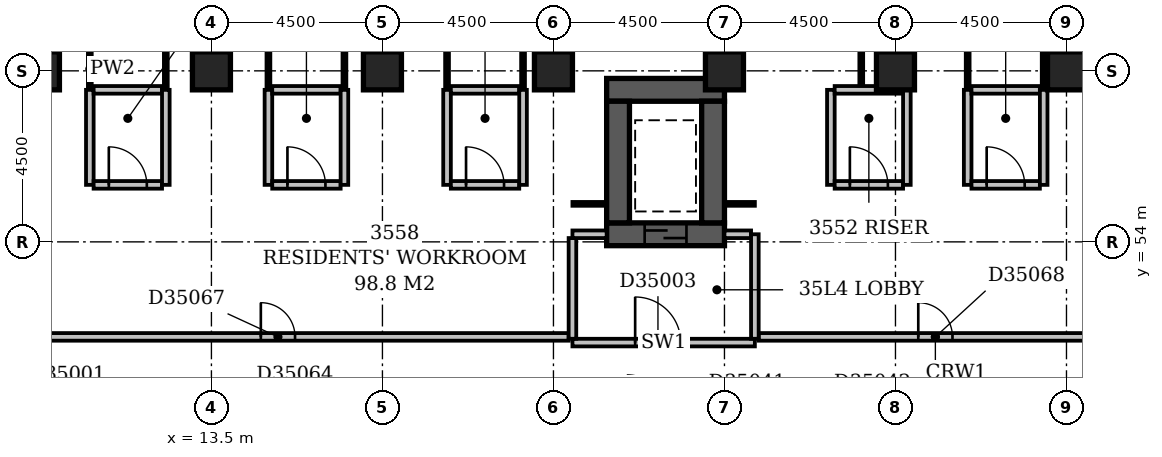
"""IFC4 building model, lengths in metres.
Left out: names, types, materials, properties, quantities, classifications, styles, units other than length and angle.
Written with IfcOpenShell. Run it as: python <this file> out.ifc"""

import sys

from ifc_helpers import new_model, si_unit, direction, frame, frame_2d, origin, origin_2d, place, context, subcontext, project, spatial, rectangle, extrude, element, fill, save


model = new_model("IFC4")
c1 = context("Model", 3, precision=1e-05, world=origin(), true_north=direction((0.0, 1.0)))
c2 = subcontext(c1, "Body", "Model", "MODEL_VIEW")
j1 = project(units=[si_unit("LENGTHUNIT", "METRE"), si_unit("PLANEANGLEUNIT", "RADIAN")], contexts=[c1])
p1 = place(None, origin())
s1 = spatial("IfcSite", under=j1, at=p1, CompositionType="ELEMENT")
p2 = place(p1, origin())
s2 = spatial("IfcBuilding", under=s1, at=p2, CompositionType="ELEMENT")
p3 = place(p2, frame((0.0, 0.0, 141.2)))
s3 = spatial("IfcBuildingStorey", under=s2, at=p3, CompositionType="ELEMENT", Elevation=141.2)
p4 = place(p3, frame((23.9, 54.2, -0.3), z_axis=(0.0, 0.0, 1.0), x_axis=(1.0, 0.0, 0.0)))
e1 = element("IfcWall", 1, at=p4, inside=s3, PredefinedType="SHEAR", context=c2, shape_type="SweptSolid", body=[
    extrude(rectangle(XDim=3.1, YDim=0.6, at=frame_2d((1.55, 0.0))), origin(), (0.0, 0.0, 1.0), 3.6),
])
p5 = place(p4, frame((1.0, 0.0, 0.3)))
e2 = element("IfcOpeningElement", 2, at=p5, cuts=e1, PredefinedType="OPENING", context=c2, shape_type="SweptSolid", body=[
    extrude(rectangle(XDim=1.1, YDim=2.1, at=frame_2d((0.55, 1.05))), frame((0.0, 0.312, 0.0), z_axis=(0.0, -1.0, 0.0), x_axis=(1.0, 0.0, 0.0)), (0.0, 0.0, 1.0), 0.624),
])
p6 = place(p3, frame((23.9, 58.0, -0.3), z_axis=(0.0, 0.0, 1.0), x_axis=(1.0, 0.0, 0.0)))
e3 = element("IfcWall", 3, at=p6, inside=s3, PredefinedType="SHEAR", context=c2, shape_type="SweptSolid", body=[
    extrude(rectangle(XDim=3.1, YDim=0.6, at=frame_2d((1.55, 0.0))), origin(), (0.0, 0.0, 1.0), 3.6),
])
for number, where, z_axis, x_axis in (
    (4, (24.2, 54.5, -0.3), (0.0, 0.0, 1.0), (0.0, 1.0, 0.0)),
    (5, (26.7, 54.5, -0.3), (0.0, 0.0, 1.0), (0.0, 1.0, 0.0)),
):
    element("IfcWall", number, at=place(p3, frame(where, z_axis=z_axis, x_axis=x_axis)), inside=s3, PredefinedType="SHEAR", context=c2, shape_type="SweptSolid", body=[
        extrude(rectangle(XDim=3.2, YDim=0.6, at=frame_2d((1.6, 0.0))), origin(), (0.0, 0.0, 1.0), 3.6),
    ])
for number, where, z_axis, x_axis in (
    (6, (9.0, 58.5, -0.3), (0.0, 0.0, 1.0), (1.0, 0.0, 0.0)),
    (7, (13.5, 58.5, -0.3), (0.0, 0.0, 1.0), (1.0, 0.0, 0.0)),
    (8, (18.0, 58.5, -0.3), (0.0, 0.0, 1.0), (1.0, 0.0, 0.0)),
    (9, (22.5, 58.5, -0.3), (0.0, 0.0, 1.0), (1.0, 0.0, 0.0)),
    (10, (27.0, 58.5, -0.3), (0.0, 0.0, 1.0), (1.0, 0.0, 0.0)),
    (11, (31.5, 58.5, -0.3), (0.0, 0.0, 1.0), (1.0, 0.0, 0.0)),
    (12, (36.0, 58.5, -0.3), (0.0, 0.0, 1.0), (1.0, 0.0, 0.0)),
):
    element("IfcColumn", number, at=place(p3, frame(where, z_axis=z_axis, x_axis=x_axis)), inside=s3, PredefinedType="COLUMN", context=c2, shape_type="SweptSolid", body=[
        extrude(rectangle(XDim=1.0, YDim=1.0, at=origin_2d()), origin(), (0.0, 0.0, 1.0), 3.6),
    ])
p7 = place(p3, frame((23.0, 51.35, 0.0), z_axis=(0.0, 0.0, 1.0), x_axis=(1.0, 0.0, 0.0)))
e13 = element("IfcWall", 13, at=p7, inside=s3, PredefinedType="PARTITIONING", context=c2, shape_type="SweptSolid", body=[
    extrude(rectangle(XDim=4.8, YDim=0.2, at=frame_2d((2.4, 0.0))), origin(), (0.0, 0.0, 1.0), 3.3),
])
p8 = place(p7, frame((1.65, 0.0, 0.0)))
e14 = element("IfcOpeningElement", 14, at=p8, cuts=e13, PredefinedType="OPENING", context=c2, shape_type="SweptSolid", body=[
    extrude(rectangle(XDim=1.2, YDim=2.1, at=frame_2d((0.6, 1.05))), frame((0.0, 0.112, 0.0), z_axis=(0.0, -1.0, 0.0), x_axis=(1.0, 0.0, 0.0)), (0.0, 0.0, 1.0), 0.224),
])
p9 = place(p3, frame((27.8, 51.45, 0.0), z_axis=(0.0, 0.0, 1.0), x_axis=(0.0, 1.0, 0.0)))
e15 = element("IfcWall", 15, at=p9, inside=s3, PredefinedType="PARTITIONING", context=c2, shape_type="SweptSolid", body=[
    extrude(rectangle(XDim=2.75, YDim=0.2, at=frame_2d((1.375, 0.0))), origin(), (0.0, 0.0, 1.0), 3.3),
])
p10 = place(p3, frame((23.0, 54.2, 0.0), z_axis=(0.0, 0.0, 1.0), x_axis=(1.0, 0.0, 0.0)))
e16 = element("IfcWall", 16, at=p10, inside=s3, PredefinedType="PARTITIONING", context=c2, shape_type="SweptSolid", body=[
    extrude(rectangle(XDim=0.9, YDim=0.2, at=frame_2d((0.45, 0.0))), origin(), (0.0, 0.0, 1.0), 3.3),
])
p11 = place(p3, frame((27.0, 54.2, 0.0), z_axis=(0.0, 0.0, 1.0), x_axis=(1.0, 0.0, 0.0)))
e17 = element("IfcWall", 17, at=p11, inside=s3, PredefinedType="PARTITIONING", context=c2, shape_type="SweptSolid", body=[
    extrude(rectangle(XDim=0.7, YDim=0.2, at=frame_2d((0.35, 0.0))), origin(), (0.0, 0.0, 1.0), 3.3),
])
p12 = place(p3, frame((23.0, 51.45, 0.0), z_axis=(0.0, 0.0, 1.0), x_axis=(0.0, 1.0, 0.0)))
e18 = element("IfcWall", 18, at=p12, inside=s3, PredefinedType="PARTITIONING", context=c2, shape_type="SweptSolid", body=[
    extrude(rectangle(XDim=2.65, YDim=0.2, at=frame_2d((1.325, 0.0))), origin(), (0.0, 0.0, 1.0), 3.3),
])
p13 = place(p3, frame((7.6, 51.5, 0.0), z_axis=(0.0, 0.0, 1.0), x_axis=(1.0, 0.0, 0.0)))
e19 = element("IfcWall", 19, at=p13, inside=s3, PredefinedType="PARTITIONING", context=c2, shape_type="SweptSolid", body=[
    extrude(rectangle(XDim=15.3, YDim=0.2, at=frame_2d((7.65, 0.0))), origin(), (0.0, 0.0, 1.0), 3.3),
])
p14 = place(p13, frame((7.2, 0.0, 0.0)))
e20 = element("IfcOpeningElement", 20, at=p14, cuts=e19, PredefinedType="OPENING", context=c2, shape_type="SweptSolid", body=[
    extrude(rectangle(XDim=0.9, YDim=2.1, at=frame_2d((0.45, 1.05))), frame((0.0, 0.112, 0.0), z_axis=(0.0, -1.0, 0.0), x_axis=(1.0, 0.0, 0.0)), (0.0, 0.0, 1.0), 0.224),
])
p15 = place(p3, frame((27.9, 51.5, 0.0), z_axis=(0.0, 0.0, 1.0), x_axis=(1.0, 0.0, 0.0)))
e21 = element("IfcWall", 21, at=p15, inside=s3, PredefinedType="PARTITIONING", context=c2, shape_type="SweptSolid", body=[
    extrude(rectangle(XDim=9.3, YDim=0.2, at=frame_2d((4.65, 0.0))), origin(), (0.0, 0.0, 1.0), 3.3),
])
p16 = place(p15, frame((4.2, 0.0, 0.0)))
e22 = element("IfcOpeningElement", 22, at=p16, cuts=e21, PredefinedType="OPENING", context=c2, shape_type="SweptSolid", body=[
    extrude(rectangle(XDim=0.9, YDim=2.1, at=frame_2d((0.45, 1.05))), frame((0.0, 0.112, 0.0), z_axis=(0.0, -1.0, 0.0), x_axis=(1.0, 0.0, 0.0)), (0.0, 0.0, 1.0), 0.224),
])
p17 = place(p3, frame((23.0, 55.0, 0.0), z_axis=(0.0, 0.0, 1.0), x_axis=(1.0, 0.0, 0.0)))
e23 = element("IfcWall", 23, at=p17, inside=s3, PredefinedType="PARTITIONING", context=c2, shape_type="SweptSolid", body=[
    extrude(rectangle(XDim=0.9, YDim=0.1, at=frame_2d((0.45, 0.0))), origin(), (0.0, 0.0, 1.0), 3.3),
])
p18 = place(p3, frame((27.0, 55.0, 0.0), z_axis=(0.0, 0.0, 1.0), x_axis=(1.0, 0.0, 0.0)))
e24 = element("IfcWall", 24, at=p18, inside=s3, PredefinedType="PARTITIONING", context=c2, shape_type="SweptSolid", body=[
    extrude(rectangle(XDim=0.8, YDim=0.1, at=frame_2d((0.4, 0.0))), origin(), (0.0, 0.0, 1.0), 3.3),
])
p19 = place(p3, frame((10.3, 55.5, 0.0), z_axis=(0.0, 0.0, 1.0), x_axis=(0.0, 1.0, 0.0)))
e25 = element("IfcWall", 25, at=p19, inside=s3, PredefinedType="PARTITIONING", context=c2, shape_type="SweptSolid", body=[
    extrude(rectangle(XDim=2.5, YDim=0.2, at=frame_2d((1.25, 0.0))), origin(), (0.0, 0.0, 1.0), 3.3),
])
p20 = place(p3, frame((10.4, 55.5, 0.0), z_axis=(0.0, 0.0, 1.0), x_axis=(1.0, 0.0, 0.0)))
e26 = element("IfcWall", 26, at=p20, inside=s3, PredefinedType="PARTITIONING", context=c2, shape_type="SweptSolid", body=[
    extrude(rectangle(XDim=1.8, YDim=0.2, at=frame_2d((0.9, 0.0))), origin(), (0.0, 0.0, 1.0), 3.3),
])
p21 = place(p20, frame((0.4, 0.0, 0.0)))
e27 = element("IfcOpeningElement", 27, at=p21, cuts=e26, PredefinedType="OPENING", context=c2, shape_type="SweptSolid", body=[
    extrude(rectangle(XDim=1.0, YDim=2.1, at=frame_2d((0.5, 1.05))), frame((0.0, 0.112, 0.0), z_axis=(0.0, -1.0, 0.0), x_axis=(1.0, 0.0, 0.0)), (0.0, 0.0, 1.0), 0.224),
])
for number, where, z_axis, x_axis in (
    (28, (12.3, 55.5, 0.0), (0.0, 0.0, 1.0), (0.0, 1.0, 0.0)),
    (29, (15.0, 55.5, 0.0), (0.0, 0.0, 1.0), (0.0, 1.0, 0.0)),
):
    element("IfcWall", number, at=place(p3, frame(where, z_axis=z_axis, x_axis=x_axis)), inside=s3, PredefinedType="PARTITIONING", context=c2, shape_type="SweptSolid", body=[
        extrude(rectangle(XDim=2.5, YDim=0.2, at=frame_2d((1.25, 0.0))), origin(), (0.0, 0.0, 1.0), 3.3),
    ])
p22 = place(p3, frame((15.1, 55.5, 0.0), z_axis=(0.0, 0.0, 1.0), x_axis=(1.0, 0.0, 0.0)))
e30 = element("IfcWall", 30, at=p22, inside=s3, PredefinedType="PARTITIONING", context=c2, shape_type="SweptSolid", body=[
    extrude(rectangle(XDim=1.8, YDim=0.2, at=frame_2d((0.9, 0.0))), origin(), (0.0, 0.0, 1.0), 3.3),
])
p23 = place(p22, frame((0.4, 0.0, 0.0)))
e31 = element("IfcOpeningElement", 31, at=p23, cuts=e30, PredefinedType="OPENING", context=c2, shape_type="SweptSolid", body=[
    extrude(rectangle(XDim=1.0, YDim=2.1, at=frame_2d((0.5, 1.05))), frame((0.0, 0.112, 0.0), z_axis=(0.0, -1.0, 0.0), x_axis=(1.0, 0.0, 0.0)), (0.0, 0.0, 1.0), 0.224),
])
for number, where, z_axis, x_axis in (
    (32, (17.0, 55.5, 0.0), (0.0, 0.0, 1.0), (0.0, 1.0, 0.0)),
    (33, (19.7, 55.5, 0.0), (0.0, 0.0, 1.0), (0.0, 1.0, 0.0)),
):
    element("IfcWall", number, at=place(p3, frame(where, z_axis=z_axis, x_axis=x_axis)), inside=s3, PredefinedType="PARTITIONING", context=c2, shape_type="SweptSolid", body=[
        extrude(rectangle(XDim=2.5, YDim=0.2, at=frame_2d((1.25, 0.0))), origin(), (0.0, 0.0, 1.0), 3.3),
    ])
p24 = place(p3, frame((19.8, 55.5, 0.0), z_axis=(0.0, 0.0, 1.0), x_axis=(1.0, 0.0, 0.0)))
e34 = element("IfcWall", 34, at=p24, inside=s3, PredefinedType="PARTITIONING", context=c2, shape_type="SweptSolid", body=[
    extrude(rectangle(XDim=1.8, YDim=0.2, at=frame_2d((0.9, 0.0))), origin(), (0.0, 0.0, 1.0), 3.3),
])
p25 = place(p24, frame((0.4, 0.0, 0.0)))
e35 = element("IfcOpeningElement", 35, at=p25, cuts=e34, PredefinedType="OPENING", context=c2, shape_type="SweptSolid", body=[
    extrude(rectangle(XDim=1.0, YDim=2.1, at=frame_2d((0.5, 1.05))), frame((0.0, 0.112, 0.0), z_axis=(0.0, -1.0, 0.0), x_axis=(1.0, 0.0, 0.0)), (0.0, 0.0, 1.0), 0.224),
])
for number, where, z_axis, x_axis in (
    (36, (21.7, 55.5, 0.0), (0.0, 0.0, 1.0), (0.0, 1.0, 0.0)),
    (37, (29.8, 55.5, 0.0), (0.0, 0.0, 1.0), (0.0, 1.0, 0.0)),
):
    element("IfcWall", number, at=place(p3, frame(where, z_axis=z_axis, x_axis=x_axis)), inside=s3, PredefinedType="PARTITIONING", context=c2, shape_type="SweptSolid", body=[
        extrude(rectangle(XDim=2.5, YDim=0.2, at=frame_2d((1.25, 0.0))), origin(), (0.0, 0.0, 1.0), 3.3),
    ])
p26 = place(p3, frame((29.9, 55.5, 0.0), z_axis=(0.0, 0.0, 1.0), x_axis=(1.0, 0.0, 0.0)))
e38 = element("IfcWall", 38, at=p26, inside=s3, PredefinedType="PARTITIONING", context=c2, shape_type="SweptSolid", body=[
    extrude(rectangle(XDim=1.8, YDim=0.2, at=frame_2d((0.9, 0.0))), origin(), (0.0, 0.0, 1.0), 3.3),
])
p27 = place(p26, frame((0.4, 0.0, 0.0)))
e39 = element("IfcOpeningElement", 39, at=p27, cuts=e38, PredefinedType="OPENING", context=c2, shape_type="SweptSolid", body=[
    extrude(rectangle(XDim=1.0, YDim=2.1, at=frame_2d((0.5, 1.05))), frame((0.0, 0.112, 0.0), z_axis=(0.0, -1.0, 0.0), x_axis=(1.0, 0.0, 0.0)), (0.0, 0.0, 1.0), 0.224),
])
for number, where, z_axis, x_axis in (
    (40, (31.8, 55.5, 0.0), (0.0, 0.0, 1.0), (0.0, 1.0, 0.0)),
    (41, (33.4, 55.5, 0.0), (0.0, 0.0, 1.0), (0.0, 1.0, 0.0)),
):
    element("IfcWall", number, at=place(p3, frame(where, z_axis=z_axis, x_axis=x_axis)), inside=s3, PredefinedType="PARTITIONING", context=c2, shape_type="SweptSolid", body=[
        extrude(rectangle(XDim=2.5, YDim=0.2, at=frame_2d((1.25, 0.0))), origin(), (0.0, 0.0, 1.0), 3.3),
    ])
p28 = place(p3, frame((33.5, 55.5, 0.0), z_axis=(0.0, 0.0, 1.0), x_axis=(1.0, 0.0, 0.0)))
e42 = element("IfcWall", 42, at=p28, inside=s3, PredefinedType="PARTITIONING", context=c2, shape_type="SweptSolid", body=[
    extrude(rectangle(XDim=1.8, YDim=0.2, at=frame_2d((0.9, 0.0))), origin(), (0.0, 0.0, 1.0), 3.3),
])
p29 = place(p28, frame((0.4, 0.0, 0.0)))
e43 = element("IfcOpeningElement", 43, at=p29, cuts=e42, PredefinedType="OPENING", context=c2, shape_type="SweptSolid", body=[
    extrude(rectangle(XDim=1.0, YDim=2.1, at=frame_2d((0.5, 1.05))), frame((0.0, 0.112, 0.0), z_axis=(0.0, -1.0, 0.0), x_axis=(1.0, 0.0, 0.0)), (0.0, 0.0, 1.0), 0.224),
])
p30 = place(p3, frame((35.4, 55.5, 0.0), z_axis=(0.0, 0.0, 1.0), x_axis=(0.0, 1.0, 0.0)))
e44 = element("IfcWall", 44, at=p30, inside=s3, PredefinedType="PARTITIONING", context=c2, shape_type="SweptSolid", body=[
    extrude(rectangle(XDim=2.5, YDim=0.2, at=frame_2d((1.25, 0.0))), origin(), (0.0, 0.0, 1.0), 2.4),
])
p31 = place(p3, frame((10.3, 58.0, 0.0), z_axis=(0.0, 0.0, 1.0), x_axis=(0.0, 1.0, 0.0)))
e45 = element("IfcWall", 45, at=p31, inside=s3, PredefinedType="PARTITIONING", context=c2, shape_type="SweptSolid", body=[
    extrude(rectangle(XDim=1.1, YDim=0.1, at=frame_2d((0.55, 0.0))), origin(), (0.0, 0.0, 1.0), 3.3),
])
p32 = place(p3, frame((10.4, 58.0, 0.0), z_axis=(0.0, 0.0, 1.0), x_axis=(1.0, 0.0, 0.0)))
e46 = element("IfcWall", 46, at=p32, inside=s3, PredefinedType="PARTITIONING", context=c2, shape_type="SweptSolid", body=[
    extrude(rectangle(XDim=1.8, YDim=0.2, at=frame_2d((0.9, 0.0))), origin(), (0.0, 0.0, 1.0), 3.3),
])
for number, where, z_axis, x_axis in (
    (47, (12.3, 58.0, 0.0), (0.0, 0.0, 1.0), (0.0, 1.0, 0.0)),
    (48, (15.0, 58.0, 0.0), (0.0, 0.0, 1.0), (0.0, 1.0, 0.0)),
):
    element("IfcWall", number, at=place(p3, frame(where, z_axis=z_axis, x_axis=x_axis)), inside=s3, PredefinedType="PARTITIONING", context=c2, shape_type="SweptSolid", body=[
        extrude(rectangle(XDim=1.1, YDim=0.1, at=frame_2d((0.55, 0.0))), origin(), (0.0, 0.0, 1.0), 3.3),
    ])
p33 = place(p3, frame((15.1, 58.0, 0.0), z_axis=(0.0, 0.0, 1.0), x_axis=(1.0, 0.0, 0.0)))
e49 = element("IfcWall", 49, at=p33, inside=s3, PredefinedType="PARTITIONING", context=c2, shape_type="SweptSolid", body=[
    extrude(rectangle(XDim=1.8, YDim=0.2, at=frame_2d((0.9, 0.0))), origin(), (0.0, 0.0, 1.0), 3.3),
])
for number, where, z_axis, x_axis in (
    (50, (17.0, 58.0, 0.0), (0.0, 0.0, 1.0), (0.0, 1.0, 0.0)),
    (51, (19.7, 58.0, 0.0), (0.0, 0.0, 1.0), (0.0, 1.0, 0.0)),
):
    element("IfcWall", number, at=place(p3, frame(where, z_axis=z_axis, x_axis=x_axis)), inside=s3, PredefinedType="PARTITIONING", context=c2, shape_type="SweptSolid", body=[
        extrude(rectangle(XDim=1.1, YDim=0.1, at=frame_2d((0.55, 0.0))), origin(), (0.0, 0.0, 1.0), 3.3),
    ])
p34 = place(p3, frame((19.8, 58.0, 0.0), z_axis=(0.0, 0.0, 1.0), x_axis=(1.0, 0.0, 0.0)))
e52 = element("IfcWall", 52, at=p34, inside=s3, PredefinedType="PARTITIONING", context=c2, shape_type="SweptSolid", body=[
    extrude(rectangle(XDim=1.8, YDim=0.2, at=frame_2d((0.9, 0.0))), origin(), (0.0, 0.0, 1.0), 3.3),
])
p35 = place(p3, frame((21.7, 58.0, 0.0), z_axis=(0.0, 0.0, 1.0), x_axis=(0.0, 1.0, 0.0)))
e53 = element("IfcWall", 53, at=p35, inside=s3, PredefinedType="PARTITIONING", context=c2, shape_type="SweptSolid", body=[
    extrude(rectangle(XDim=1.1, YDim=0.1, at=frame_2d((0.55, 0.0))), origin(), (0.0, 0.0, 1.0), 3.3),
])
p36 = place(p3, frame((29.9, 58.0, 0.0), z_axis=(0.0, 0.0, 1.0), x_axis=(1.0, 0.0, 0.0)))
e54 = element("IfcWall", 54, at=p36, inside=s3, PredefinedType="PARTITIONING", context=c2, shape_type="SweptSolid", body=[
    extrude(rectangle(XDim=1.8, YDim=0.2, at=frame_2d((0.9, 0.0))), origin(), (0.0, 0.0, 1.0), 3.3),
])
p37 = place(p3, frame((33.4, 58.0, 0.0), z_axis=(0.0, 0.0, 1.0), x_axis=(0.0, 1.0, 0.0)))
e55 = element("IfcWall", 55, at=p37, inside=s3, PredefinedType="PARTITIONING", context=c2, shape_type="SweptSolid", body=[
    extrude(rectangle(XDim=1.1, YDim=0.1, at=frame_2d((0.55, 0.0))), origin(), (0.0, 0.0, 1.0), 3.3),
])
p38 = place(p3, frame((33.5, 58.0, 0.0), z_axis=(0.0, 0.0, 1.0), x_axis=(1.0, 0.0, 0.0)))
e56 = element("IfcWall", 56, at=p38, inside=s3, PredefinedType="PARTITIONING", context=c2, shape_type="SweptSolid", body=[
    extrude(rectangle(XDim=1.8, YDim=0.2, at=frame_2d((0.9, 0.0))), origin(), (0.0, 0.0, 1.0), 3.3),
])
p39 = place(p3, frame((35.4, 58.0, 0.0), z_axis=(0.0, 0.0, 1.0), x_axis=(0.0, 1.0, 0.0)))
e57 = element("IfcWall", 57, at=p39, inside=s3, PredefinedType="PARTITIONING", context=c2, shape_type="SweptSolid", body=[
    extrude(rectangle(XDim=1.1, YDim=0.1, at=frame_2d((0.55, 0.0))), origin(), (0.0, 0.0, 1.0), 2.4),
])
p40 = place(p3, frame((30.6, 58.1, 0.0), z_axis=(0.0, 0.0, 1.0), x_axis=(0.0, 1.0, 0.0)))
e58 = element("IfcWall", 58, at=p40, inside=s3, PredefinedType="PARTITIONING", context=c2, shape_type="SweptSolid", body=[
    extrude(rectangle(XDim=1.0, YDim=0.1, at=frame_2d((0.5, 0.0))), origin(), (0.0, 0.0, 1.0), 3.3),
])
p41 = place(p8, origin())
e59 = element("IfcDoor", 59, at=p41, inside=s3, OperationType="SINGLE_SWING_LEFT", PredefinedType="DOOR", context=c2, shape_type="SweptSolid", body=[
    extrude(rectangle(XDim=1.2, YDim=2.1, at=frame_2d((0.6, 1.05))), frame((0.0, 0.025, 0.0), z_axis=(0.0, -1.0, 0.0), x_axis=(1.0, 0.0, 0.0)), (0.0, 0.0, 1.0), 0.05),
])
fill(e14, e59)
p42 = place(p5, origin())
e60 = element("IfcDoor", 60, at=p42, inside=s3, OperationType="SLIDING_TO_LEFT", PredefinedType="DOOR", context=c2, shape_type="SweptSolid", body=[
    extrude(rectangle(XDim=1.1, YDim=2.1, at=frame_2d((0.55, 1.05))), frame((0.0, 0.025, 0.0), z_axis=(0.0, -1.0, 0.0), x_axis=(1.0, 0.0, 0.0)), (0.0, 0.0, 1.0), 0.05),
])
fill(e2, e60)
p43 = place(p14, origin())
e61 = element("IfcDoor", 61, at=p43, inside=s3, OperationType="SINGLE_SWING_LEFT", PredefinedType="DOOR", context=c2, shape_type="SweptSolid", body=[
    extrude(rectangle(XDim=0.9, YDim=2.1, at=frame_2d((0.45, 1.05))), frame((0.0, 0.025, 0.0), z_axis=(0.0, -1.0, 0.0), x_axis=(1.0, 0.0, 0.0)), (0.0, 0.0, 1.0), 0.05),
])
fill(e20, e61)
p44 = place(p16, origin())
e62 = element("IfcDoor", 62, at=p44, inside=s3, OperationType="SINGLE_SWING_LEFT", PredefinedType="DOOR", context=c2, shape_type="SweptSolid", body=[
    extrude(rectangle(XDim=0.9, YDim=2.1, at=frame_2d((0.45, 1.05))), frame((0.0, 0.025, 0.0), z_axis=(0.0, -1.0, 0.0), x_axis=(1.0, 0.0, 0.0)), (0.0, 0.0, 1.0), 0.05),
])
fill(e22, e62)
p45 = place(p21, origin())
e63 = element("IfcDoor", 63, at=p45, inside=s3, OperationType="SINGLE_SWING_LEFT", PredefinedType="DOOR", context=c2, shape_type="SweptSolid", body=[
    extrude(rectangle(XDim=1.0, YDim=2.1, at=frame_2d((0.5, 1.05))), frame((0.0, 0.025, 0.0), z_axis=(0.0, -1.0, 0.0), x_axis=(1.0, 0.0, 0.0)), (0.0, 0.0, 1.0), 0.05),
])
fill(e27, e63)
p46 = place(p23, origin())
e64 = element("IfcDoor", 64, at=p46, inside=s3, OperationType="SINGLE_SWING_LEFT", PredefinedType="DOOR", context=c2, shape_type="SweptSolid", body=[
    extrude(rectangle(XDim=1.0, YDim=2.1, at=frame_2d((0.5, 1.05))), frame((0.0, 0.025, 0.0), z_axis=(0.0, -1.0, 0.0), x_axis=(1.0, 0.0, 0.0)), (0.0, 0.0, 1.0), 0.05),
])
fill(e31, e64)
p47 = place(p25, origin())
e65 = element("IfcDoor", 65, at=p47, inside=s3, OperationType="SINGLE_SWING_LEFT", PredefinedType="DOOR", context=c2, shape_type="SweptSolid", body=[
    extrude(rectangle(XDim=1.0, YDim=2.1, at=frame_2d((0.5, 1.05))), frame((0.0, 0.025, 0.0), z_axis=(0.0, -1.0, 0.0), x_axis=(1.0, 0.0, 0.0)), (0.0, 0.0, 1.0), 0.05),
])
fill(e35, e65)
p48 = place(p27, origin())
e66 = element("IfcDoor", 66, at=p48, inside=s3, OperationType="SINGLE_SWING_LEFT", PredefinedType="DOOR", context=c2, shape_type="SweptSolid", body=[
    extrude(rectangle(XDim=1.0, YDim=2.1, at=frame_2d((0.5, 1.05))), frame((0.0, 0.025, 0.0), z_axis=(0.0, -1.0, 0.0), x_axis=(1.0, 0.0, 0.0)), (0.0, 0.0, 1.0), 0.05),
])
fill(e39, e66)
p49 = place(p29, origin())
e67 = element("IfcDoor", 67, at=p49, inside=s3, OperationType="SINGLE_SWING_LEFT", PredefinedType="DOOR", context=c2, shape_type="SweptSolid", body=[
    extrude(rectangle(XDim=1.0, YDim=2.1, at=frame_2d((0.5, 1.05))), frame((0.0, 0.025, 0.0), z_axis=(0.0, -1.0, 0.0), x_axis=(1.0, 0.0, 0.0)), (0.0, 0.0, 1.0), 0.05),
])
fill(e43, e67)
save(model, sys.argv[1])
